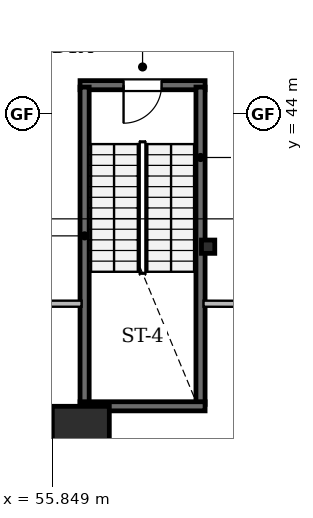
"""IFC4 building model, lengths in metres.
Left out: names, types, materials, properties, quantities, classifications, styles, units other than length and angle.
Written with IfcOpenShell. Run it as: python <this file> out.ifc"""

import sys

from ifc_helpers import new_model, si_unit, direction, frame, frame_2d, origin, origin_2d, place, context, subcontext, project, spatial, rectangle, i_section, extrude, element, fill, save


model = new_model("IFC4")
c1 = context("Model", 3, precision=1e-05, world=origin(), true_north=direction((0.0, 1.0)))
c2 = subcontext(c1, "Body", "Model", "MODEL_VIEW")
j1 = project(units=[si_unit("LENGTHUNIT", "METRE"), si_unit("PLANEANGLEUNIT", "RADIAN")], contexts=[c1])
p1 = place(None, origin())
s1 = spatial("IfcSite", under=j1, at=p1, CompositionType="ELEMENT")
p2 = place(p1, origin())
s2 = spatial("IfcBuilding", under=s1, at=p2, CompositionType="ELEMENT")
p3 = place(p2, frame((0.0, 0.0, 14.4)))
s3 = spatial("IfcBuildingStorey", under=s2, at=p3, CompositionType="ELEMENT", Elevation=14.4)
p4 = place(p3, frame((56.6, 35.8, 0.0), z_axis=(0.0, 0.0, 1.0), x_axis=(1.0, 0.0, 0.0)))
e1 = element("IfcColumn", 1, at=p4, inside=s3, PredefinedType="COLUMN", context=c2, shape_type="SweptSolid", body=[
    extrude(rectangle(XDim=1.5, YDim=1.0, at=origin_2d()), origin(), (0.0, 0.0, 1.0), 4.8),
])
p5 = place(p3, frame((59.95, 40.5, 0.0), z_axis=(0.0, 0.0, 1.0), x_axis=(1.0, 0.0, 0.0)))
e2 = element("IfcColumn", 2, at=p5, inside=s3, PredefinedType="PILASTER", context=c2, shape_type="SweptSolid", body=[
    extrude(i_section(OverallWidth=0.35, OverallDepth=0.35, WebThickness=0.012, FlangeThickness=0.019, FilletRadius=0.02, at=origin_2d()), origin(), (0.0, 0.0, 1.0), 4.8),
])
p6 = place(p3, frame((56.58, 44.75, 0.0), z_axis=(0.0, 0.0, 1.0), x_axis=(1.0, 0.0, 0.0)))
e3 = element("IfcWall", 3, at=p6, inside=s3, PredefinedType="SHEAR", context=c2, shape_type="SweptSolid", body=[
    extrude(rectangle(XDim=3.29, YDim=0.24, at=frame_2d((1.645, 0.0))), origin(), (0.0, 0.0, 1.0), 4.5),
])
p7 = place(p6, frame((1.145, 0.0, 0.0)))
e4 = element("IfcOpeningElement", 4, at=p7, cuts=e3, PredefinedType="OPENING", context=c2, shape_type="SweptSolid", body=[
    extrude(rectangle(XDim=1.0, YDim=2.15, at=frame_2d((0.5, 1.075))), frame((0.0, 0.13, 0.0), z_axis=(0.0, -1.0, 0.0), x_axis=(1.0, 0.0, 0.0)), (0.0, 0.0, 1.0), 0.26),
])
for number, where, z_axis, x_axis in (
    (5, (56.7, 36.35, 0.0), (0.0, 0.0, 1.0), (0.0, 1.0, 0.0)),
    (6, (59.75, 36.35, 0.0), (0.0, 0.0, 1.0), (0.0, 1.0, 0.0)),
):
    element("IfcWall", number, at=place(p3, frame(where, z_axis=z_axis, x_axis=x_axis)), inside=s3, PredefinedType="SHEAR", context=c2, shape_type="SweptSolid", body=[
        extrude(rectangle(XDim=8.35, YDim=0.24, at=frame_2d((4.175, 0.0))), origin(), (0.0, 0.0, 1.0), 4.5),
    ])
p8 = place(p3, frame((56.58, 36.3, 0.0), z_axis=(0.0, 0.0, 1.0), x_axis=(1.0, 0.0, 0.0)))
e7 = element("IfcWall", 7, at=p8, inside=s3, PredefinedType="SHEAR", context=c2, shape_type="SweptSolid", body=[
    extrude(rectangle(XDim=3.29, YDim=0.24, at=frame_2d((1.645, 0.0))), origin(), (0.0, 0.0, 1.0), 4.5),
])
p9 = place(p3, frame((72.334, 38.965, 0.0), z_axis=(0.0, 0.0, 1.0), x_axis=(-0.999996102122, 0.002792085337, 0.0)))
e8 = element("IfcWall", 8, at=p9, inside=s3, PredefinedType="SOLIDWALL", context=c2, shape_type="SweptSolid", body=[
    extrude(rectangle(XDim=12.504, YDim=0.16, at=frame_2d((6.252, 0.0))), origin(), (0.0, 0.0, 1.0), 3.788),
])
p10 = place(p3, frame((56.62, 39.0, 0.0), z_axis=(0.0, 0.0, 1.0), x_axis=(-1.0, 0.0, 0.0)))
e9 = element("IfcWall", 9, at=p10, inside=s3, PredefinedType="SOLIDWALL", context=c2, shape_type="SweptSolid", body=[
    extrude(rectangle(XDim=1.94, YDim=0.16, at=frame_2d((0.97, 0.0))), origin(), (0.0, 0.0, 1.0), 3.688),
])
p11 = place(p7, frame((1.0, 0.0, 0.0), z_axis=(0.0, 0.0, 1.0), x_axis=(-1.0, 0.0, 0.0)))
e10 = element("IfcDoor", 10, at=p11, inside=s3, OperationType="SINGLE_SWING_LEFT", PredefinedType="DOOR", context=c2, shape_type="SweptSolid", body=[
    extrude(rectangle(XDim=1.0, YDim=2.15, at=frame_2d((0.5, 1.075))), frame((0.0, 0.025, 0.0), z_axis=(0.0, -1.0, 0.0), x_axis=(1.0, 0.0, 0.0)), (0.0, 0.0, 1.0), 0.05),
])
fill(e4, e10)
save(model, sys.argv[1])
